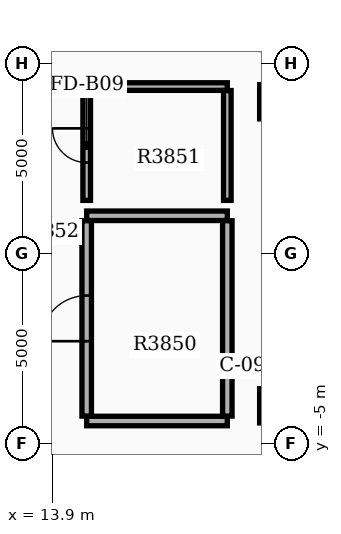
"""IFC4 building model, lengths in metres.
Left out: names, types, materials, properties, quantities, classifications, styles, units other than length and angle.
Written with IfcOpenShell. Run it as: python <this file> out.ifc"""

import sys

from ifc_helpers import new_model, si_unit, direction, frame, frame_2d, origin, origin_2d, place, context, subcontext, project, spatial, rectangle, extrude, element, fill, save


model = new_model("IFC4")
c1 = context("Model", 3, precision=1e-05, world=origin(), true_north=direction((0.0, 1.0)))
c2 = subcontext(c1, "Body", "Model", "MODEL_VIEW")
j1 = project(units=[si_unit("LENGTHUNIT", "METRE"), si_unit("PLANEANGLEUNIT", "RADIAN")], contexts=[c1])
p1 = place(None, origin())
s1 = spatial("IfcSite", under=j1, at=p1, CompositionType="ELEMENT")
p2 = place(p1, origin())
s2 = spatial("IfcBuilding", under=s1, at=p2, CompositionType="ELEMENT")
p3 = place(p2, frame((0.0, 0.0, 240.3)))
s3 = spatial("IfcBuildingStorey", under=s2, at=p3, CompositionType="ELEMENT", Elevation=240.3)
for number, where, z_axis, x_axis in (
    (1, (19.8, -4.0, 0.0), (0.0, 0.0, 1.0), (1.0, 0.0, 0.0)),
    (2, (19.8, 4.0, 0.0), (0.0, 0.0, 1.0), (1.0, 0.0, 0.0)),
):
    element("IfcColumn", number, at=place(p3, frame(where, z_axis=z_axis, x_axis=x_axis)), inside=s3, PredefinedType="COLUMN", context=c2, shape_type="SweptSolid", body=[
        extrude(rectangle(XDim=0.9, YDim=0.9, at=origin_2d()), origin(), (0.0, 0.0, 1.0), 5.1),
    ])
p4 = place(p3, frame((30.003, 4.846, 0.0), z_axis=(0.0, 0.0, 1.0), x_axis=(-0.998027423805, 0.062779465852, 0.0)))
e3 = element("IfcWall", 3, at=p4, inside=s3, PredefinedType="STANDARD", context=c2, shape_type="SweptSolid", body=[
    extrude(rectangle(XDim=14.7, YDim=0.28, at=frame_2d((7.35, 0.0))), origin(), (0.0, 0.0, 1.0), 3.93),
])
p5 = place(p4, frame((0.85, 0.0, 0.95)))
e4 = element("IfcOpeningElement", 4, at=p5, cuts=e3, PredefinedType="OPENING", context=c2, shape_type="SweptSolid", body=[
    extrude(rectangle(XDim=1.1, YDim=1.2, at=frame_2d((0.55, 0.6))), frame((0.0, 0.15, 0.0), z_axis=(0.0, -1.0, 0.0), x_axis=(1.0, 0.0, 0.0)), (0.0, 0.0, 1.0), 0.3),
])
for number, where, z_axis, x_axis in (
    (5, (14.8, -4.4, 0.0), (0.0, 0.0, 1.0), (1.0, 0.0, 0.0)),
    (6, (14.8, 1.0, 0.0), (0.0, 0.0, 1.0), (1.0, 0.0, 0.0)),
):
    element("IfcWall", number, at=place(p3, frame(where, z_axis=z_axis, x_axis=x_axis)), inside=s3, PredefinedType="SOLIDWALL", context=c2, shape_type="SweptSolid", body=[
        extrude(rectangle(XDim=3.7, YDim=0.25, at=frame_2d((1.85, 0.0))), origin(), (0.0, 0.0, 1.0), 3.92),
    ])
p6 = place(p3, frame((14.8, -4.27, 0.0), z_axis=(0.0, 0.0, 1.0), x_axis=(0.0, 1.0, 0.0)))
e7 = element("IfcWall", 7, at=p6, inside=s3, PredefinedType="SOLIDWALL", context=c2, shape_type="SweptSolid", body=[
    extrude(rectangle(XDim=5.14, YDim=0.25, at=frame_2d((2.57, 0.0))), origin(), (0.0, 0.0, 1.0), 3.92),
])
p7 = place(p6, frame((1.97, 0.0, 0.0)))
e8 = element("IfcOpeningElement", 8, at=p7, cuts=e7, PredefinedType="OPENING", context=c2, shape_type="SweptSolid", body=[
    extrude(rectangle(XDim=1.2, YDim=2.15, at=frame_2d((0.6, 1.075))), frame((0.0, 0.135, 0.0), z_axis=(0.0, -1.0, 0.0), x_axis=(1.0, 0.0, 0.0)), (0.0, 0.0, 1.0), 0.27),
])
p8 = place(p3, frame((18.5, -4.27, 0.0), z_axis=(0.0, 0.0, 1.0), x_axis=(0.0, 1.0, 0.0)))
e9 = element("IfcWall", 9, at=p8, inside=s3, PredefinedType="SOLIDWALL", context=c2, shape_type="SweptSolid", body=[
    extrude(rectangle(XDim=5.14, YDim=0.25, at=frame_2d((2.57, 0.0))), origin(), (0.0, 0.0, 1.0), 3.92),
])
p9 = place(p3, frame((14.8, 4.4, 0.0), z_axis=(0.0, 0.0, 1.0), x_axis=(1.0, 0.0, 0.0)))
e10 = element("IfcWall", 10, at=p9, inside=s3, PredefinedType="PARTITIONING", context=c2, shape_type="SweptSolid", body=[
    extrude(rectangle(XDim=3.7, YDim=0.2, at=frame_2d((1.85, 0.0))), origin(), (0.0, 0.0, 1.0), 3.92),
])
p10 = place(p3, frame((14.8, 1.405, 0.0), z_axis=(0.0, 0.0, 1.0), x_axis=(0.0, 1.0, 0.0)))
e11 = element("IfcWall", 11, at=p10, inside=s3, PredefinedType="PARTITIONING", context=c2, shape_type="SweptSolid", body=[
    extrude(rectangle(XDim=2.89, YDim=0.2, at=frame_2d((1.445, 0.0))), origin(), (0.0, 0.0, 1.0), 3.92),
])
p11 = place(p10, frame((0.995, 0.0, 0.0)))
e12 = element("IfcOpeningElement", 12, at=p11, cuts=e11, PredefinedType="OPENING", context=c2, shape_type="SweptSolid", body=[
    extrude(rectangle(XDim=0.9, YDim=2.15, at=frame_2d((0.45, 1.075))), frame((0.0, 0.11, 0.0), z_axis=(0.0, -1.0, 0.0), x_axis=(1.0, 0.0, 0.0)), (0.0, 0.0, 1.0), 0.22),
])
p12 = place(p3, frame((18.5, 1.405, 0.0), z_axis=(0.0, 0.0, 1.0), x_axis=(0.0, 1.0, 0.0)))
e13 = element("IfcWall", 13, at=p12, inside=s3, PredefinedType="PARTITIONING", context=c2, shape_type="SweptSolid", body=[
    extrude(rectangle(XDim=2.89, YDim=0.2, at=frame_2d((1.445, 0.0))), origin(), (0.0, 0.0, 1.0), 3.92),
])
p13 = place(p7, origin())
e14 = element("IfcDoor", 14, at=p13, inside=s3, OperationType="SINGLE_SWING_LEFT", PredefinedType="DOOR", context=c2, shape_type="SweptSolid", body=[
    extrude(rectangle(XDim=1.2, YDim=2.15, at=frame_2d((0.6, 1.075))), frame((0.0, 0.025, 0.0), z_axis=(0.0, -1.0, 0.0), x_axis=(1.0, 0.0, 0.0)), (0.0, 0.0, 1.0), 0.05),
])
fill(e8, e14)
p14 = place(p11, origin())
e15 = element("IfcDoor", 15, at=p14, inside=s3, OperationType="SINGLE_SWING_RIGHT", PredefinedType="DOOR", context=c2, shape_type="SweptSolid", body=[
    extrude(rectangle(XDim=0.9, YDim=2.15, at=frame_2d((0.45, 1.075))), frame((0.0, 0.025, 0.0), z_axis=(0.0, -1.0, 0.0), x_axis=(1.0, 0.0, 0.0)), (0.0, 0.0, 1.0), 0.05),
])
fill(e12, e15)
save(model, sys.argv[1])
